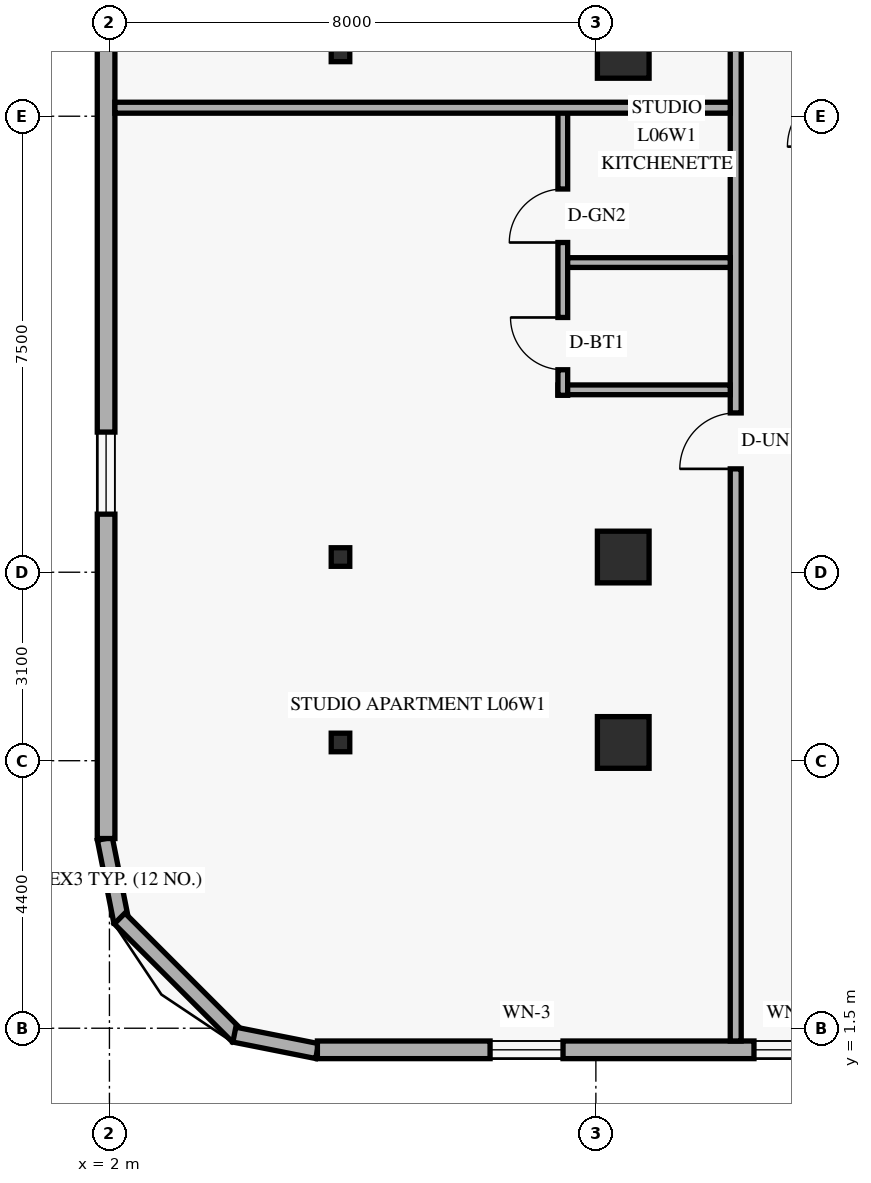
"""IFC4 building model, lengths in metres.
Left out: names, types, materials, properties, quantities, classifications, styles, units other than length and angle.
Written with IfcOpenShell. Run it as: python <this file> out.ifc"""

import sys

from ifc_helpers import new_model, si_unit, direction, frame, frame_2d, origin, origin_2d, place, context, subcontext, project, spatial, rectangle, hollow_rectangle, extrude, element, fill, save


model = new_model("IFC4")
c1 = context("Model", 3, precision=1e-05, world=origin(), true_north=direction((0.0, 1.0)))
c2 = subcontext(c1, "Body", "Model", "MODEL_VIEW")
j1 = project(units=[si_unit("LENGTHUNIT", "METRE"), si_unit("PLANEANGLEUNIT", "RADIAN")], contexts=[c1])
p1 = place(None, origin())
s1 = spatial("IfcSite", under=j1, at=p1, CompositionType="ELEMENT")
p2 = place(p1, origin())
s2 = spatial("IfcBuilding", under=s1, at=p2, CompositionType="ELEMENT")
p3 = place(p2, frame((0.0, 0.0, 27.6)))
s3 = spatial("IfcBuildingStorey", under=s2, at=p3, CompositionType="ELEMENT", Elevation=27.6)
for number, where, z_axis, x_axis in (
    (1, (5.8, 6.2, 0.0), (0.0, 0.0, 1.0), (1.0, 0.0, 0.0)),
    (2, (5.8, 9.25, 0.0), (0.0, 0.0, 1.0), (1.0, 0.0, 0.0)),
    (3, (5.8, 17.55, 0.0), (0.0, 0.0, 1.0), (1.0, 0.0, 0.0)),
):
    element("IfcColumn", number, at=place(p3, frame(where, z_axis=z_axis, x_axis=x_axis)), inside=s3, PredefinedType="COLUMN", context=c2, shape_type="SweptSolid", body=[
        extrude(hollow_rectangle(XDim=0.305, YDim=0.305, WallThickness=0.013, at=origin_2d()), origin(), (0.0, 0.0, 1.0), 3.6),
    ])
for number, where, z_axis, x_axis in (
    (4, (10.45, 6.2, 0.0), (0.0, 0.0, 1.0), (1.0, 0.0, 0.0)),
    (5, (10.45, 9.25, 0.0), (0.0, 0.0, 1.0), (1.0, 0.0, 0.0)),
    (6, (10.45, 17.55, 0.0), (0.0, 0.0, 1.0), (1.0, 0.0, 0.0)),
):
    element("IfcColumn", number, at=place(p3, frame(where, z_axis=z_axis, x_axis=x_axis)), inside=s3, PredefinedType="COLUMN", context=c2, shape_type="SweptSolid", body=[
        extrude(rectangle(XDim=0.85, YDim=0.85, at=origin_2d()), origin(), (0.0, 0.0, 1.0), 3.6),
    ])
p4 = place(p3, frame((1.924, 4.616, 0.0), z_axis=(0.0, 0.0, 1.0), x_axis=(0.19496651342, -0.980809899341, 0.0)))
e7 = element("IfcWall", 7, at=p4, inside=s3, PredefinedType="SOLIDWALL", context=c2, shape_type="SweptSolid", body=[
    extrude(rectangle(XDim=1.389, YDim=0.25, at=frame_2d((0.694, 0.0))), origin(), (0.0, 0.0, 1.0), 3.36),
])
p5 = place(p3, frame((2.168, 3.305, 0.0), z_axis=(0.0, 0.0, 1.0), x_axis=(0.707106781187, -0.707106781187, 0.0)))
e8 = element("IfcWall", 8, at=p5, inside=s3, PredefinedType="SOLIDWALL", context=c2, shape_type="SweptSolid", body=[
    extrude(rectangle(XDim=2.739, YDim=0.25, at=frame_2d((1.37, 0.0))), origin(), (0.0, 0.0, 1.0), 3.36),
])
p6 = place(p3, frame((4.054, 1.395, 0.0), z_axis=(0.0, 0.0, 1.0), x_axis=(0.980809899341, -0.19496651342, 0.0)))
e9 = element("IfcWall", 9, at=p6, inside=s3, PredefinedType="SOLIDWALL", context=c2, shape_type="SweptSolid", body=[
    extrude(rectangle(XDim=1.389, YDim=0.25, at=frame_2d((0.694, 0.0))), origin(), (0.0, 0.0, 1.0), 3.36),
])
p7 = place(p3, frame((5.42, 1.145, 0.0), z_axis=(0.0, 0.0, 1.0), x_axis=(1.0, 0.0, 0.0)))
e10 = element("IfcWall", 10, at=p7, inside=s3, PredefinedType="SOLIDWALL", context=c2, shape_type="SweptSolid", body=[
    extrude(rectangle(XDim=39.56, YDim=0.29, at=frame_2d((19.78, 0.0))), origin(), (0.0, 0.0, 1.0), 3.36),
])
p8 = place(p7, frame((2.84, 0.0, 0.85)))
e11 = element("IfcOpeningElement", 11, at=p8, cuts=e10, PredefinedType="OPENING", context=c2, shape_type="SweptSolid", body=[
    extrude(rectangle(XDim=1.2, YDim=1.5, at=frame_2d((0.6, 0.75))), frame((0.0, 0.155, 0.0), z_axis=(0.0, -1.0, 0.0), x_axis=(1.0, 0.0, 0.0)), (0.0, 0.0, 1.0), 0.31),
])
p9 = place(p7, frame((7.18, 0.0, 0.85)))
e12 = element("IfcOpeningElement", 12, at=p9, cuts=e10, PredefinedType="OPENING", context=c2, shape_type="SweptSolid", body=[
    extrude(rectangle(XDim=1.2, YDim=1.5, at=frame_2d((0.6, 0.75))), frame((0.0, 0.155, 0.0), z_axis=(0.0, -1.0, 0.0), x_axis=(1.0, 0.0, 0.0)), (0.0, 0.0, 1.0), 0.31),
])
p10 = place(p7, frame((11.245, 0.0, 0.85)))
e13 = element("IfcOpeningElement", 13, at=p10, cuts=e10, PredefinedType="OPENING", context=c2, shape_type="SweptSolid", body=[
    extrude(rectangle(XDim=1.2, YDim=1.5, at=frame_2d((0.6, 0.75))), frame((0.0, 0.155, 0.0), z_axis=(0.0, -1.0, 0.0), x_axis=(1.0, 0.0, 0.0)), (0.0, 0.0, 1.0), 0.31),
])
p11 = place(p7, frame((16.48, 0.0, 0.85)))
e14 = element("IfcOpeningElement", 14, at=p11, cuts=e10, PredefinedType="OPENING", context=c2, shape_type="SweptSolid", body=[
    extrude(rectangle(XDim=1.2, YDim=1.5, at=frame_2d((0.6, 0.75))), frame((0.0, 0.155, 0.0), z_axis=(0.0, -1.0, 0.0), x_axis=(1.0, 0.0, 0.0)), (0.0, 0.0, 1.0), 0.31),
])
p12 = place(p7, frame((21.905, 0.0, 0.85)))
e15 = element("IfcOpeningElement", 15, at=p12, cuts=e10, PredefinedType="OPENING", context=c2, shape_type="SweptSolid", body=[
    extrude(rectangle(XDim=1.2, YDim=1.5, at=frame_2d((0.6, 0.75))), frame((0.0, 0.155, 0.0), z_axis=(0.0, -1.0, 0.0), x_axis=(1.0, 0.0, 0.0)), (0.0, 0.0, 1.0), 0.31),
])
p13 = place(p7, frame((27.33, 0.0, 0.85)))
e16 = element("IfcOpeningElement", 16, at=p13, cuts=e10, PredefinedType="OPENING", context=c2, shape_type="SweptSolid", body=[
    extrude(rectangle(XDim=1.2, YDim=1.5, at=frame_2d((0.6, 0.75))), frame((0.0, 0.155, 0.0), z_axis=(0.0, -1.0, 0.0), x_axis=(1.0, 0.0, 0.0)), (0.0, 0.0, 1.0), 0.31),
])
p14 = place(p7, frame((30.465, 0.0, 0.85)))
e17 = element("IfcOpeningElement", 17, at=p14, cuts=e10, PredefinedType="OPENING", context=c2, shape_type="SweptSolid", body=[
    extrude(rectangle(XDim=1.2, YDim=1.5, at=frame_2d((0.6, 0.75))), frame((0.0, 0.155, 0.0), z_axis=(0.0, -1.0, 0.0), x_axis=(1.0, 0.0, 0.0)), (0.0, 0.0, 1.0), 0.31),
])
p15 = place(p7, frame((35.245, 0.0, 0.85)))
e18 = element("IfcOpeningElement", 18, at=p15, cuts=e10, PredefinedType="OPENING", context=c2, shape_type="SweptSolid", body=[
    extrude(rectangle(XDim=1.2, YDim=1.5, at=frame_2d((0.6, 0.75))), frame((0.0, 0.155, 0.0), z_axis=(0.0, -1.0, 0.0), x_axis=(1.0, 0.0, 0.0)), (0.0, 0.0, 1.0), 0.31),
])
p16 = place(p3, frame((1.945, 43.38, 0.0), z_axis=(0.0, 0.0, 1.0), x_axis=(0.0, -1.0, 0.0)))
e19 = element("IfcWall", 19, at=p16, inside=s3, PredefinedType="SOLIDWALL", context=c2, shape_type="SweptSolid", body=[
    extrude(rectangle(XDim=38.76, YDim=0.29, at=frame_2d((19.38, 0.0))), origin(), (0.0, 0.0, 1.0), 3.36),
])
p17 = place(p16, frame((32.075, 0.0, 0.85)))
e20 = element("IfcOpeningElement", 20, at=p17, cuts=e19, PredefinedType="OPENING", context=c2, shape_type="SweptSolid", body=[
    extrude(rectangle(XDim=1.35, YDim=1.55, at=frame_2d((0.675, 0.775))), frame((0.0, 0.155, 0.0), z_axis=(0.0, -1.0, 0.0), x_axis=(1.0, 0.0, 0.0)), (0.0, 0.0, 1.0), 0.31),
])
p18 = place(p16, frame((24.063, 0.0, 0.85)))
e21 = element("IfcOpeningElement", 21, at=p18, cuts=e19, PredefinedType="OPENING", context=c2, shape_type="SweptSolid", body=[
    extrude(rectangle(XDim=1.35, YDim=1.55, at=frame_2d((0.675, 0.775))), frame((0.0, 0.155, 0.0), z_axis=(0.0, -1.0, 0.0), x_axis=(1.0, 0.0, 0.0)), (0.0, 0.0, 1.0), 0.31),
])
p19 = place(p16, frame((18.238, 0.0, 0.85)))
e22 = element("IfcOpeningElement", 22, at=p19, cuts=e19, PredefinedType="OPENING", context=c2, shape_type="SweptSolid", body=[
    extrude(rectangle(XDim=1.35, YDim=1.55, at=frame_2d((0.675, 0.775))), frame((0.0, 0.155, 0.0), z_axis=(0.0, -1.0, 0.0), x_axis=(1.0, 0.0, 0.0)), (0.0, 0.0, 1.0), 0.31),
])
p20 = place(p16, frame((12.42, 0.0, 0.85)))
e23 = element("IfcOpeningElement", 23, at=p20, cuts=e19, PredefinedType="OPENING", context=c2, shape_type="SweptSolid", body=[
    extrude(rectangle(XDim=1.35, YDim=1.55, at=frame_2d((0.675, 0.775))), frame((0.0, 0.155, 0.0), z_axis=(0.0, -1.0, 0.0), x_axis=(1.0, 0.0, 0.0)), (0.0, 0.0, 1.0), 0.31),
])
p21 = place(p16, frame((8.79, 0.0, 0.85)))
e24 = element("IfcOpeningElement", 24, at=p21, cuts=e19, PredefinedType="OPENING", context=c2, shape_type="SweptSolid", body=[
    extrude(rectangle(XDim=1.35, YDim=1.55, at=frame_2d((0.675, 0.775))), frame((0.0, 0.155, 0.0), z_axis=(0.0, -1.0, 0.0), x_axis=(1.0, 0.0, 0.0)), (0.0, 0.0, 1.0), 0.31),
])
p22 = place(p16, frame((3.24, 0.0, 0.85)))
e25 = element("IfcOpeningElement", 25, at=p22, cuts=e19, PredefinedType="OPENING", context=c2, shape_type="SweptSolid", body=[
    extrude(rectangle(XDim=1.35, YDim=1.55, at=frame_2d((0.675, 0.775))), frame((0.0, 0.155, 0.0), z_axis=(0.0, -1.0, 0.0), x_axis=(1.0, 0.0, 0.0)), (0.0, 0.0, 1.0), 0.31),
])
p23 = place(p3, frame((12.3, 1.29, 0.0), z_axis=(0.0, 0.0, 1.0), x_axis=(0.0, 1.0, 0.0)))
e26 = element("IfcWall", 26, at=p23, inside=s3, PredefinedType="STANDARD", context=c2, shape_type="SweptSolid", body=[
    extrude(rectangle(XDim=45.42, YDim=0.18, at=frame_2d((22.71, 0.0))), origin(), (0.0, 0.0, 1.0), 2.649),
])
p24 = place(p23, frame((9.41, 0.0, 0.0)))
e27 = element("IfcOpeningElement", 27, at=p24, cuts=e26, PredefinedType="OPENING", context=c2, shape_type="SweptSolid", body=[
    extrude(rectangle(XDim=0.92, YDim=2.15, at=frame_2d((0.46, 1.075))), frame((0.0, 0.1, 0.0), z_axis=(0.0, -1.0, 0.0), x_axis=(1.0, 0.0, 0.0)), (0.0, 0.0, 1.0), 0.2),
])
p25 = place(p23, frame((21.05, 0.0, 0.0)))
e28 = element("IfcOpeningElement", 28, at=p25, cuts=e26, PredefinedType="OPENING", context=c2, shape_type="SweptSolid", body=[
    extrude(rectangle(XDim=0.92, YDim=2.15, at=frame_2d((0.46, 1.075))), frame((0.0, 0.1, 0.0), z_axis=(0.0, -1.0, 0.0), x_axis=(1.0, 0.0, 0.0)), (0.0, 0.0, 1.0), 0.2),
])
p26 = place(p23, frame((36.491, 0.0, 0.0)))
e29 = element("IfcOpeningElement", 29, at=p26, cuts=e26, PredefinedType="OPENING", context=c2, shape_type="SweptSolid", body=[
    extrude(rectangle(XDim=0.92, YDim=2.15, at=frame_2d((0.46, 1.075))), frame((0.0, 0.1, 0.0), z_axis=(0.0, -1.0, 0.0), x_axis=(1.0, 0.0, 0.0)), (0.0, 0.0, 1.0), 0.2),
])
p27 = place(p3, frame((9.376, 12.0, 0.0), z_axis=(0.0, 0.0, 1.0), x_axis=(1.0, 0.0, 0.0)))
e30 = element("IfcWall", 30, at=p27, inside=s3, PredefinedType="PLUMBINGWALL", context=c2, shape_type="SweptSolid", body=[
    extrude(rectangle(XDim=2.834, YDim=0.16, at=frame_2d((1.417, 0.0))), origin(), (0.0, 0.0, 1.0), 2.649),
])
p28 = place(p3, frame((9.456, 11.91, 0.0), z_axis=(0.0, 0.0, 1.0), x_axis=(0.0, 1.0, 0.0)))
e31 = element("IfcWall", 31, at=p28, inside=s3, PredefinedType="PLUMBINGWALL", context=c2, shape_type="SweptSolid", body=[
    extrude(rectangle(XDim=4.73, YDim=0.16, at=frame_2d((2.365, 0.0))), origin(), (0.0, 0.0, 1.0), 2.932),
])
p29 = place(p28, frame((0.42, 0.0, 0.0)))
e32 = element("IfcOpeningElement", 32, at=p29, cuts=e31, PredefinedType="OPENING", context=c2, shape_type="SweptSolid", body=[
    extrude(rectangle(XDim=0.86, YDim=2.12, at=frame_2d((0.43, 1.06))), frame((0.0, 0.09, 0.0), z_axis=(0.0, -1.0, 0.0), x_axis=(1.0, 0.0, 0.0)), (0.0, 0.0, 1.0), 0.18),
])
p30 = place(p28, frame((2.513, 0.0, 0.0)))
e33 = element("IfcOpeningElement", 33, at=p30, cuts=e31, PredefinedType="OPENING", context=c2, shape_type="SweptSolid", body=[
    extrude(rectangle(XDim=0.88, YDim=2.12, at=frame_2d((0.44, 1.06))), frame((0.0, 0.09, 0.0), z_axis=(0.0, -1.0, 0.0), x_axis=(1.0, 0.0, 0.0)), (0.0, 0.0, 1.0), 0.18),
])
p31 = place(p3, frame((9.536, 14.093, 0.0), z_axis=(0.0, 0.0, 1.0), x_axis=(1.0, 0.0, 0.0)))
e34 = element("IfcWall", 34, at=p31, inside=s3, PredefinedType="PLUMBINGWALL", context=c2, shape_type="SweptSolid", body=[
    extrude(rectangle(XDim=2.674, YDim=0.16, at=frame_2d((1.337, 0.0))), origin(), (0.0, 0.0, 1.0), 2.649),
])
p32 = place(p3, frame((2.09, 16.64, 0.0), z_axis=(0.0, 0.0, 1.0), x_axis=(1.0, 0.0, 0.0)))
e35 = element("IfcWall", 35, at=p32, inside=s3, PredefinedType="PARTITIONING", context=c2, shape_type="SweptSolid", body=[
    extrude(rectangle(XDim=10.12, YDim=0.18, at=frame_2d((5.06, 0.0))), origin(), (0.0, 0.0, 1.0), 2.649),
])
p33 = place(p8, origin())
e36 = element("IfcWindow", 36, at=p33, inside=s3, PartitioningType="SINGLE_PANEL", PredefinedType="WINDOW", context=c2, shape_type="SweptSolid", body=[
    extrude(rectangle(XDim=1.2, YDim=1.5, at=frame_2d((0.6, 0.75))), frame((0.0, 0.03, 0.0), z_axis=(0.0, -1.0, 0.0), x_axis=(1.0, 0.0, 0.0)), (0.0, 0.0, 1.0), 0.06),
])
fill(e11, e36)
p34 = place(p9, origin())
e37 = element("IfcWindow", 37, at=p34, inside=s3, PartitioningType="SINGLE_PANEL", PredefinedType="WINDOW", context=c2, shape_type="SweptSolid", body=[
    extrude(rectangle(XDim=1.2, YDim=1.5, at=frame_2d((0.6, 0.75))), frame((0.0, 0.03, 0.0), z_axis=(0.0, -1.0, 0.0), x_axis=(1.0, 0.0, 0.0)), (0.0, 0.0, 1.0), 0.06),
])
fill(e12, e37)
p35 = place(p17, origin())
e38 = element("IfcWindow", 38, at=p35, inside=s3, PartitioningType="SINGLE_PANEL", PredefinedType="WINDOW", context=c2, shape_type="SweptSolid", body=[
    extrude(rectangle(XDim=1.35, YDim=1.55, at=frame_2d((0.675, 0.775))), frame((0.0, 0.03, 0.0), z_axis=(0.0, -1.0, 0.0), x_axis=(1.0, 0.0, 0.0)), (0.0, 0.0, 1.0), 0.06),
])
fill(e20, e38)
p36 = place(p24, origin())
e39 = element("IfcDoor", 39, at=p36, inside=s3, OperationType="SINGLE_SWING_LEFT", PredefinedType="DOOR", context=c2, shape_type="SweptSolid", body=[
    extrude(rectangle(XDim=0.92, YDim=2.15, at=frame_2d((0.46, 1.075))), frame((0.0, 0.025, 0.0), z_axis=(0.0, -1.0, 0.0), x_axis=(1.0, 0.0, 0.0)), (0.0, 0.0, 1.0), 0.05),
])
fill(e27, e39)
p37 = place(p29, origin())
e40 = element("IfcDoor", 40, at=p37, inside=s3, OperationType="SINGLE_SWING_RIGHT", PredefinedType="DOOR", context=c2, shape_type="SweptSolid", body=[
    extrude(rectangle(XDim=0.86, YDim=2.12, at=frame_2d((0.43, 1.06))), frame((0.0, 0.025, 0.0), z_axis=(0.0, -1.0, 0.0), x_axis=(1.0, 0.0, 0.0)), (0.0, 0.0, 1.0), 0.05),
])
fill(e32, e40)
p38 = place(p30, origin())
e41 = element("IfcDoor", 41, at=p38, inside=s3, OperationType="SINGLE_SWING_LEFT", PredefinedType="DOOR", context=c2, shape_type="SweptSolid", body=[
    extrude(rectangle(XDim=0.88, YDim=2.12, at=frame_2d((0.44, 1.06))), frame((0.0, 0.025, 0.0), z_axis=(0.0, -1.0, 0.0), x_axis=(1.0, 0.0, 0.0)), (0.0, 0.0, 1.0), 0.05),
])
fill(e33, e41)
save(model, sys.argv[1])
